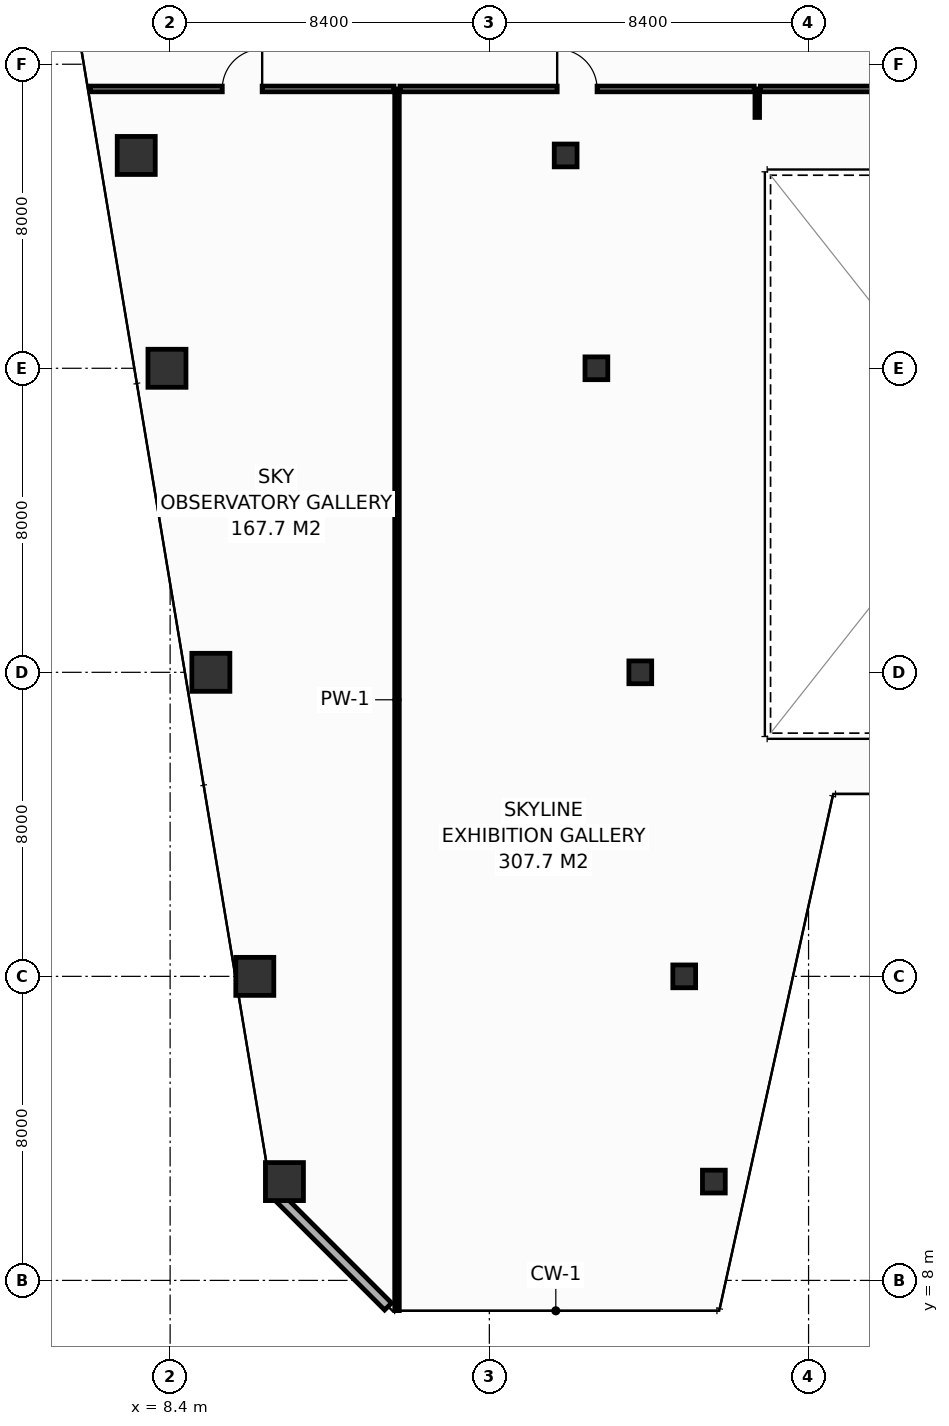
"""IFC4 building model, lengths in metres.
Left out: names, types, materials, properties, quantities, classifications, styles, units other than length and angle.
Written with IfcOpenShell. Run it as: python <this file> out.ifc"""

import sys

from ifc_helpers import new_model, si_unit, direction, frame, frame_2d, origin, origin_2d, place, context, subcontext, project, spatial, rectangle, hollow_rectangle, extrude, element, fill, save


model = new_model("IFC4")
c1 = context("Model", 3, precision=1e-05, world=origin(), true_north=direction((0.0, 1.0)))
c2 = subcontext(c1, "Body", "Model", "MODEL_VIEW")
j1 = project(units=[si_unit("LENGTHUNIT", "METRE"), si_unit("PLANEANGLEUNIT", "RADIAN")], contexts=[c1])
p1 = place(None, origin())
s1 = spatial("IfcSite", under=j1, at=p1, CompositionType="ELEMENT")
p2 = place(p1, origin())
s2 = spatial("IfcBuilding", under=s1, at=p2, CompositionType="ELEMENT")
p3 = place(p2, frame((0.0, 0.0, 152.4)))
s3 = spatial("IfcBuildingStorey", under=s2, at=p3, CompositionType="ELEMENT", Elevation=152.4)
p4 = place(p3, frame((11.408, 10.6, 0.0), z_axis=(0.0, 0.0, 1.0), x_axis=(1.0, 0.0, 0.0)))
e1 = element("IfcColumn", 1, at=p4, inside=s3, PredefinedType="COLUMN", context=c2, shape_type="SweptSolid", body=[
    extrude(hollow_rectangle(XDim=1.0, YDim=1.0, WallThickness=0.045, at=origin_2d()), origin(), (0.0, 0.0, 1.0), 3.8),
])
p5 = place(p3, frame((22.708, 10.6, 0.0), z_axis=(0.0, 0.0, 1.0), x_axis=(1.0, 0.0, 0.0)))
e2 = element("IfcColumn", 2, at=p5, inside=s3, PredefinedType="COLUMN", context=c2, shape_type="SweptSolid", body=[
    extrude(hollow_rectangle(XDim=0.6, YDim=0.6, WallThickness=0.028, at=origin_2d()), origin(), (0.0, 0.0, 1.0), 3.8),
])
p6 = place(p3, frame((10.628, 16.0, 0.0), z_axis=(0.0, 0.0, 1.0), x_axis=(1.0, 0.0, 0.0)))
e3 = element("IfcColumn", 3, at=p6, inside=s3, PredefinedType="COLUMN", context=c2, shape_type="SweptSolid", body=[
    extrude(hollow_rectangle(XDim=1.0, YDim=1.0, WallThickness=0.045, at=origin_2d()), origin(), (0.0, 0.0, 1.0), 3.8),
])
p7 = place(p3, frame((21.928, 16.0, 0.0), z_axis=(0.0, 0.0, 1.0), x_axis=(1.0, 0.0, 0.0)))
e4 = element("IfcColumn", 4, at=p7, inside=s3, PredefinedType="COLUMN", context=c2, shape_type="SweptSolid", body=[
    extrude(hollow_rectangle(XDim=0.6, YDim=0.6, WallThickness=0.028, at=origin_2d()), origin(), (0.0, 0.0, 1.0), 3.8),
])
p8 = place(p3, frame((9.472, 24.0, 0.0), z_axis=(0.0, 0.0, 1.0), x_axis=(1.0, 0.0, 0.0)))
e5 = element("IfcColumn", 5, at=p8, inside=s3, PredefinedType="COLUMN", context=c2, shape_type="SweptSolid", body=[
    extrude(hollow_rectangle(XDim=1.0, YDim=1.0, WallThickness=0.045, at=origin_2d()), origin(), (0.0, 0.0, 1.0), 3.8),
])
p9 = place(p3, frame((20.772, 24.0, 0.0), z_axis=(0.0, 0.0, 1.0), x_axis=(1.0, 0.0, 0.0)))
e6 = element("IfcColumn", 6, at=p9, inside=s3, PredefinedType="COLUMN", context=c2, shape_type="SweptSolid", body=[
    extrude(hollow_rectangle(XDim=0.6, YDim=0.6, WallThickness=0.028, at=origin_2d()), origin(), (0.0, 0.0, 1.0), 3.8),
])
p10 = place(p3, frame((8.317, 32.0, 0.0), z_axis=(0.0, 0.0, 1.0), x_axis=(1.0, 0.0, 0.0)))
e7 = element("IfcColumn", 7, at=p10, inside=s3, PredefinedType="COLUMN", context=c2, shape_type="SweptSolid", body=[
    extrude(hollow_rectangle(XDim=1.0, YDim=1.0, WallThickness=0.045, at=origin_2d()), origin(), (0.0, 0.0, 1.0), 3.8),
])
p11 = place(p3, frame((19.617, 32.0, 0.0), z_axis=(0.0, 0.0, 1.0), x_axis=(1.0, 0.0, 0.0)))
e8 = element("IfcColumn", 8, at=p11, inside=s3, PredefinedType="COLUMN", context=c2, shape_type="SweptSolid", body=[
    extrude(hollow_rectangle(XDim=0.6, YDim=0.6, WallThickness=0.028, at=origin_2d()), origin(), (0.0, 0.0, 1.0), 3.8),
])
p12 = place(p3, frame((7.508, 37.6, 0.0), z_axis=(0.0, 0.0, 1.0), x_axis=(1.0, 0.0, 0.0)))
e9 = element("IfcColumn", 9, at=p12, inside=s3, PredefinedType="COLUMN", context=c2, shape_type="SweptSolid", body=[
    extrude(hollow_rectangle(XDim=1.0, YDim=1.0, WallThickness=0.045, at=origin_2d()), origin(), (0.0, 0.0, 1.0), 3.8),
])
p13 = place(p3, frame((18.808, 37.6, 0.0), z_axis=(0.0, 0.0, 1.0), x_axis=(1.0, 0.0, 0.0)))
e10 = element("IfcColumn", 10, at=p13, inside=s3, PredefinedType="COLUMN", context=c2, shape_type="SweptSolid", body=[
    extrude(hollow_rectangle(XDim=0.6, YDim=0.6, WallThickness=0.028, at=origin_2d()), origin(), (0.0, 0.0, 1.0), 3.8),
])
p14 = place(p3, frame((11.162, 10.287, 0.0), z_axis=(0.0, 0.0, 1.0), x_axis=(0.70707775441, -0.707135806771, 0.0)))
e11 = element("IfcWall", 11, at=p14, inside=s3, PredefinedType="STANDARD", context=c2, shape_type="SweptSolid", body=[
    extrude(rectangle(XDim=4.206, YDim=0.26, at=frame_2d((2.103, 0.0))), origin(), (0.0, 0.0, 1.0), 3.55),
])
p15 = place(p3, frame((14.37, 7.205, 0.0), z_axis=(0.0, 0.0, 1.0), x_axis=(0.0, 1.0, 0.0)))
e12 = element("IfcWall", 12, at=p15, inside=s3, PredefinedType="PARTITIONING", context=c2, shape_type="SweptSolid", body=[
    extrude(rectangle(XDim=32.145, YDim=0.12, at=frame_2d((16.073, 0.0))), origin(), (0.0, 0.0, 1.0), 2.835),
])
p16 = place(p3, frame((23.85, 38.6, 0.0), z_axis=(0.0, 0.0, 1.0), x_axis=(0.0, 1.0, 0.0)))
e13 = element("IfcWall", 13, at=p16, inside=s3, PredefinedType="PARTITIONING", context=c2, shape_type="SweptSolid", body=[
    extrude(rectangle(XDim=0.75, YDim=0.12, at=frame_2d((0.375, 0.0))), origin(), (0.0, 0.0, 1.0), 3.55),
])
p17 = place(p3, frame((6.305, 39.35, 0.0), z_axis=(0.0, 0.0, 1.0), x_axis=(1.0, 0.0, 0.0)))
e14 = element("IfcWall", 14, at=p17, inside=s3, PredefinedType="PARTITIONING", context=c2, shape_type="SweptSolid", body=[
    extrude(rectangle(XDim=7.985, YDim=0.15, at=frame_2d((3.993, 0.0))), origin(), (0.0, 0.0, 1.0), 3.035),
])
p18 = place(p17, frame((3.467, 0.0, 0.0)))
e15 = element("IfcOpeningElement", 15, at=p18, cuts=e14, PredefinedType="OPENING", context=c2, shape_type="SweptSolid", body=[
    extrude(rectangle(XDim=1.05, YDim=2.15, at=frame_2d((0.525, 1.075))), frame((0.0, 0.085, 0.0), z_axis=(0.0, -1.0, 0.0), x_axis=(1.0, 0.0, 0.0)), (0.0, 0.0, 1.0), 0.17),
])
p19 = place(p3, frame((14.45, 39.35, 0.0), z_axis=(0.0, 0.0, 1.0), x_axis=(1.0, 0.0, 0.0)))
e16 = element("IfcWall", 16, at=p19, inside=s3, PredefinedType="PARTITIONING", context=c2, shape_type="SweptSolid", body=[
    extrude(rectangle(XDim=9.32, YDim=0.15, at=frame_2d((4.66, 0.0))), origin(), (0.0, 0.0, 1.0), 2.835),
])
p20 = place(p19, frame((4.135, 0.0, 0.0)))
e17 = element("IfcOpeningElement", 17, at=p20, cuts=e16, PredefinedType="OPENING", context=c2, shape_type="SweptSolid", body=[
    extrude(rectangle(XDim=1.05, YDim=2.15, at=frame_2d((0.525, 1.075))), frame((0.0, 0.085, 0.0), z_axis=(0.0, -1.0, 0.0), x_axis=(1.0, 0.0, 0.0)), (0.0, 0.0, 1.0), 0.17),
])
p21 = place(p3, frame((23.93, 39.35, 0.0), z_axis=(0.0, 0.0, 1.0), x_axis=(1.0, 0.0, 0.0)))
e18 = element("IfcWall", 18, at=p21, inside=s3, PredefinedType="PARTITIONING", context=c2, shape_type="SweptSolid", body=[
    extrude(rectangle(XDim=12.14, YDim=0.15, at=frame_2d((6.07, 0.0))), origin(), (0.0, 0.0, 1.0), 3.55),
])
p22 = place(p18, origin())
e19 = element("IfcDoor", 19, at=p22, inside=s3, OperationType="SINGLE_SWING_RIGHT", PredefinedType="DOOR", context=c2, shape_type="SweptSolid", body=[
    extrude(rectangle(XDim=1.05, YDim=2.15, at=frame_2d((0.525, 1.075))), frame((0.0, 0.025, 0.0), z_axis=(0.0, -1.0, 0.0), x_axis=(1.0, 0.0, 0.0)), (0.0, 0.0, 1.0), 0.05),
])
fill(e15, e19)
p23 = place(p20, origin())
e20 = element("IfcDoor", 20, at=p23, inside=s3, OperationType="SINGLE_SWING_LEFT", PredefinedType="DOOR", context=c2, shape_type="SweptSolid", body=[
    extrude(rectangle(XDim=1.05, YDim=2.15, at=frame_2d((0.525, 1.075))), frame((0.0, 0.025, 0.0), z_axis=(0.0, -1.0, 0.0), x_axis=(1.0, 0.0, 0.0)), (0.0, 0.0, 1.0), 0.05),
])
fill(e17, e20)
save(model, sys.argv[1])
